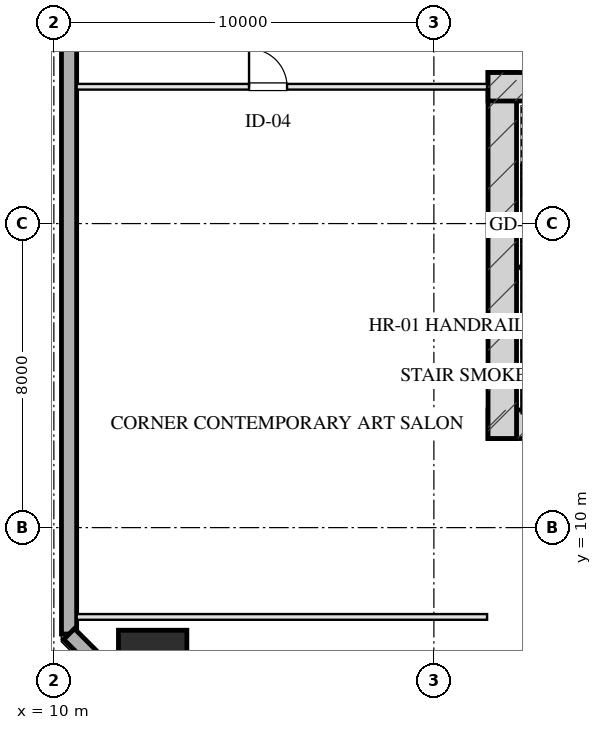
"""IFC4 building model, lengths in metres.
Left out: names, types, materials, properties, quantities, classifications, styles, units other than length and angle.
Written with IfcOpenShell. Run it as: python <this file> out.ifc"""

import sys

from ifc_helpers import new_model, si_unit, direction, frame, frame_2d, origin, origin_2d, place, context, subcontext, project, spatial, rectangle, hollow_rectangle, extrude, element, fill, save


model = new_model("IFC4")
c1 = context("Model", 3, precision=1e-05, world=origin(), true_north=direction((0.0, 1.0)))
c2 = subcontext(c1, "Body", "Model", "MODEL_VIEW")
j1 = project(units=[si_unit("LENGTHUNIT", "METRE"), si_unit("PLANEANGLEUNIT", "RADIAN")], contexts=[c1])
p1 = place(None, origin())
s1 = spatial("IfcSite", under=j1, at=p1, CompositionType="ELEMENT")
p2 = place(p1, origin())
s2 = spatial("IfcBuilding", under=s1, at=p2, CompositionType="ELEMENT")
p3 = place(p2, frame((0.0, 0.0, 60.95)))
s3 = spatial("IfcBuildingStorey", under=s2, at=p3, CompositionType="ELEMENT", Elevation=60.95)
p4 = place(p3, frame((21.425, 12.72, 0.0), z_axis=(0.0, 0.0, 1.0), x_axis=(1.0, 0.0, 0.0)))
e1 = element("IfcWall", 1, at=p4, inside=s3, PredefinedType="SHEAR", context=c2, shape_type="SweptSolid", body=[
    extrude(rectangle(XDim=17.15, YDim=0.75, at=frame_2d((8.575, 0.0))), origin(), (0.0, 0.0, 1.0), 3.45),
])
p5 = place(p3, frame((21.8, 21.975, 0.0), z_axis=(0.0, 0.0, 1.0), x_axis=(0.0, -1.0, 0.0)))
e2 = element("IfcWall", 2, at=p5, inside=s3, PredefinedType="SHEAR", context=c2, shape_type="SweptSolid", body=[
    extrude(rectangle(XDim=9.63, YDim=0.75, at=frame_2d((4.815, 0.0))), origin(), (0.0, 0.0, 1.0), 3.45),
])
p6 = place(p3, frame((21.425, 21.6, 0.0), z_axis=(0.0, 0.0, 1.0), x_axis=(1.0, 0.0, 0.0)))
e3 = element("IfcWall", 3, at=p6, inside=s3, PredefinedType="SHEAR", context=c2, shape_type="SweptSolid", body=[
    extrude(rectangle(XDim=4.295, YDim=0.75, at=frame_2d((2.147, 0.0))), origin(), (0.0, 0.0, 1.0), 3.45),
])
p7 = place(p3, frame((12.6, 6.4, 0.0), z_axis=(0.0, 0.0, 1.0), x_axis=(1.0, 0.0, 0.0)))
e4 = element("IfcColumn", 4, at=p7, inside=s3, PredefinedType="COLUMN", context=c2, shape_type="SweptSolid", body=[
    extrude(hollow_rectangle(XDim=1.8, YDim=1.8, WallThickness=0.06, at=origin_2d()), origin(), (0.0, 0.0, 1.0), 3.451),
])
p8 = place(p3, frame((10.4, 7.2, 0.0), z_axis=(0.0, 0.0, 1.0), x_axis=(0.0, 1.0, 0.0)))
e5 = element("IfcWall", 5, at=p8, inside=s3, PredefinedType="SOLIDWALL", context=c2, shape_type="SweptSolid", body=[
    extrude(rectangle(XDim=53.6, YDim=0.4, at=frame_2d((26.8, 0.0))), origin(), (0.0, 0.0, 1.0), 2.61),
])
p9 = place(p8, frame((31.95, 0.0, 0.75)))
e6 = element("IfcOpeningElement", 6, at=p9, cuts=e5, PredefinedType="OPENING", context=c2, shape_type="SweptSolid", body=[
    extrude(rectangle(XDim=2.5, YDim=1.46, at=frame_2d((1.25, 0.73))), frame((0.0, 0.21, 0.0), z_axis=(0.0, -1.0, 0.0), x_axis=(1.0, 0.0, 0.0)), (0.0, 0.0, 1.0), 0.42),
])
p10 = place(p8, frame((20.292, 0.0, 0.0)))
e7 = element("IfcOpeningElement", 7, at=p10, cuts=e5, PredefinedType="OPENING", context=c2, shape_type="SweptSolid", body=[
    extrude(rectangle(XDim=1.1, YDim=2.15, at=frame_2d((0.55, 1.075))), frame((0.0, 0.21, 0.0), z_axis=(0.0, -1.0, 0.0), x_axis=(1.0, 0.0, 0.0)), (0.0, 0.0, 1.0), 0.42),
])
p11 = place(p3, frame((13.4, 4.2, 0.0), z_axis=(0.0, 0.0, 1.0), x_axis=(-0.707106781187, 0.707106781187, 0.0)))
e8 = element("IfcWall", 8, at=p11, inside=s3, PredefinedType="SOLIDWALL", context=c2, shape_type="SweptSolid", body=[
    extrude(rectangle(XDim=4.243, YDim=0.4, at=frame_2d((2.121, 0.0))), origin(), (0.0, 0.0, 1.0), 2.61),
])
p12 = place(p3, frame((10.6, 7.65, 0.0), z_axis=(0.0, 0.0, 1.0), x_axis=(1.0, 0.0, 0.0)))
e9 = element("IfcWall", 9, at=p12, inside=s3, PredefinedType="PARTITIONING", context=c2, shape_type="SweptSolid", body=[
    extrude(rectangle(XDim=10.8, YDim=0.15, at=frame_2d((5.4, 0.0))), origin(), (0.0, 0.0, 1.0), 3.175),
])
p13 = place(p3, frame((10.6, 21.6, 0.0), z_axis=(0.0, 0.0, 1.0), x_axis=(1.0, 0.0, 0.0)))
e10 = element("IfcWall", 10, at=p13, inside=s3, PredefinedType="PARTITIONING", context=c2, shape_type="SweptSolid", body=[
    extrude(rectangle(XDim=10.8, YDim=0.15, at=frame_2d((5.4, 0.0))), origin(), (0.0, 0.0, 1.0), 3.175),
])
p14 = place(p13, frame((4.536, 0.0, 0.0)))
e11 = element("IfcOpeningElement", 11, at=p14, cuts=e10, PredefinedType="OPENING", context=c2, shape_type="SweptSolid", body=[
    extrude(rectangle(XDim=1.0, YDim=2.05, at=frame_2d((0.5, 1.025))), frame((0.0, 0.085, 0.0), z_axis=(0.0, -1.0, 0.0), x_axis=(1.0, 0.0, 0.0)), (0.0, 0.0, 1.0), 0.17),
])
p15 = place(p14, origin())
e12 = element("IfcDoor", 12, at=p15, inside=s3, OperationType="SINGLE_SWING_LEFT", PredefinedType="DOOR", context=c2, shape_type="SweptSolid", body=[
    extrude(rectangle(XDim=1.0, YDim=2.05, at=frame_2d((0.5, 1.025))), frame((0.0, 0.025, 0.0), z_axis=(0.0, -1.0, 0.0), x_axis=(1.0, 0.0, 0.0)), (0.0, 0.0, 1.0), 0.05),
])
fill(e11, e12)
save(model, sys.argv[1])
